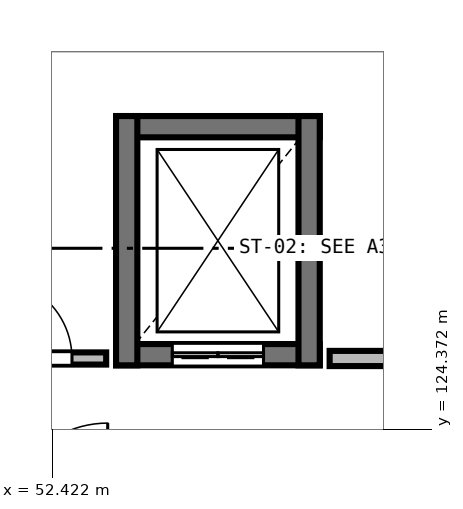
"""IFC4 building model, lengths in metres.
Left out: names, types, materials, properties, quantities, classifications, styles, units other than length and angle.
Written with IfcOpenShell. Run it as: python <this file> out.ifc"""

import sys

from ifc_helpers import new_model, si_unit, direction, frame, frame_2d, origin, place, context, subcontext, project, spatial, rectangle, extrude, element, fill, save


model = new_model("IFC4")
c1 = context("Model", 3, precision=1e-05, world=origin(), true_north=direction((0.0, 1.0)))
c2 = subcontext(c1, "Body", "Model", "MODEL_VIEW")
j1 = project(units=[si_unit("LENGTHUNIT", "METRE"), si_unit("PLANEANGLEUNIT", "RADIAN")], contexts=[c1])
p1 = place(None, origin())
s1 = spatial("IfcSite", under=j1, at=p1, CompositionType="ELEMENT")
p2 = place(p1, origin())
s2 = spatial("IfcBuilding", under=s1, at=p2, CompositionType="ELEMENT")
p3 = place(p2, frame((0.0, 0.0, 5.1)))
s3 = spatial("IfcBuildingStorey", under=s2, at=p3, CompositionType="ELEMENT", Elevation=5.1)
p4 = place(p3, frame((55.94, 125.35, 0.0), z_axis=(0.0, 0.0, 1.0), x_axis=(-1.0, 0.0, 0.0)))
e1 = element("IfcWall", 1, at=p4, inside=s3, PredefinedType="SHEAR", context=c2, shape_type="SweptSolid", body=[
    extrude(rectangle(XDim=2.68, YDim=0.28, at=frame_2d((1.34, 0.0))), origin(), (0.0, 0.0, 1.0), 3.92),
])
p5 = place(p4, frame((0.74, 0.0, 0.0)))
e2 = element("IfcOpeningElement", 2, at=p5, cuts=e1, PredefinedType="OPENING", context=c2, shape_type="SweptSolid", body=[
    extrude(rectangle(XDim=1.2, YDim=2.15, at=frame_2d((0.6, 1.075))), frame((0.0, 0.15, 0.0), z_axis=(0.0, -1.0, 0.0), x_axis=(1.0, 0.0, 0.0)), (0.0, 0.0, 1.0), 0.3),
])
p6 = place(p3, frame((53.26, 128.35, 0.0), z_axis=(0.0, 0.0, 1.0), x_axis=(1.0, 0.0, 0.0)))
e3 = element("IfcWall", 3, at=p6, inside=s3, PredefinedType="SHEAR", context=c2, shape_type="SweptSolid", body=[
    extrude(rectangle(XDim=2.68, YDim=0.28, at=frame_2d((1.34, 0.0))), origin(), (0.0, 0.0, 1.0), 3.92),
])
for number, where, z_axis, x_axis in (
    (4, (53.4, 125.21, 0.0), (0.0, 0.0, 1.0), (0.0, 1.0, 0.0)),
    (5, (55.8, 128.49, 0.0), (0.0, 0.0, 1.0), (0.0, -1.0, 0.0)),
):
    element("IfcWall", number, at=place(p3, frame(where, z_axis=z_axis, x_axis=x_axis)), inside=s3, PredefinedType="SHEAR", context=c2, shape_type="SweptSolid", body=[
        extrude(rectangle(XDim=3.28, YDim=0.28, at=frame_2d((1.64, 0.0))), origin(), (0.0, 0.0, 1.0), 3.92),
    ])
p7 = place(p3, frame((50.4, 125.3, 0.0), z_axis=(0.0, 0.0, 1.0), x_axis=(1.0, 0.0, 0.0)))
e6 = element("IfcWall", 6, at=p7, inside=s3, PredefinedType="PARTITIONING", context=c2, shape_type="SweptSolid", body=[
    extrude(rectangle(XDim=2.73, YDim=0.16, at=frame_2d((1.365, 0.0))), origin(), (0.0, 0.0, 1.0), 3.305),
])
p8 = place(p7, frame((1.23, 0.0, 0.0)))
e7 = element("IfcOpeningElement", 7, at=p8, cuts=e6, PredefinedType="OPENING", context=c2, shape_type="SweptSolid", body=[
    extrude(rectangle(XDim=1.05, YDim=2.15, at=frame_2d((0.525, 1.075))), frame((0.0, 0.09, 0.0), z_axis=(0.0, -1.0, 0.0), x_axis=(1.0, 0.0, 0.0)), (0.0, 0.0, 1.0), 0.18),
])
p9 = place(p3, frame((56.07, 125.3, 0.0), z_axis=(0.0, 0.0, 1.0), x_axis=(1.0, 0.0, 0.0)))
e8 = element("IfcWall", 8, at=p9, inside=s3, PredefinedType="SOLIDWALL", context=c2, shape_type="SweptSolid", body=[
    extrude(rectangle(XDim=36.33, YDim=0.2, at=frame_2d((18.165, 0.0))), origin(), (0.0, 0.0, 1.0), 3.305),
])
p10 = place(p5, origin())
e9 = element("IfcDoor", 9, at=p10, inside=s3, OperationType="DOUBLE_DOOR_SLIDING", PredefinedType="DOOR", context=c2, shape_type="SweptSolid", body=[
    extrude(rectangle(XDim=1.2, YDim=2.15, at=frame_2d((0.6, 1.075))), frame((0.0, 0.025, 0.0), z_axis=(0.0, -1.0, 0.0), x_axis=(1.0, 0.0, 0.0)), (0.0, 0.0, 1.0), 0.05),
])
fill(e2, e9)
p11 = place(p8, origin())
e10 = element("IfcDoor", 10, at=p11, inside=s3, OperationType="SINGLE_SWING_LEFT", PredefinedType="DOOR", context=c2, shape_type="SweptSolid", body=[
    extrude(rectangle(XDim=1.05, YDim=2.15, at=frame_2d((0.525, 1.075))), frame((0.0, 0.025, 0.0), z_axis=(0.0, -1.0, 0.0), x_axis=(1.0, 0.0, 0.0)), (0.0, 0.0, 1.0), 0.05),
])
fill(e7, e10)
save(model, sys.argv[1])
